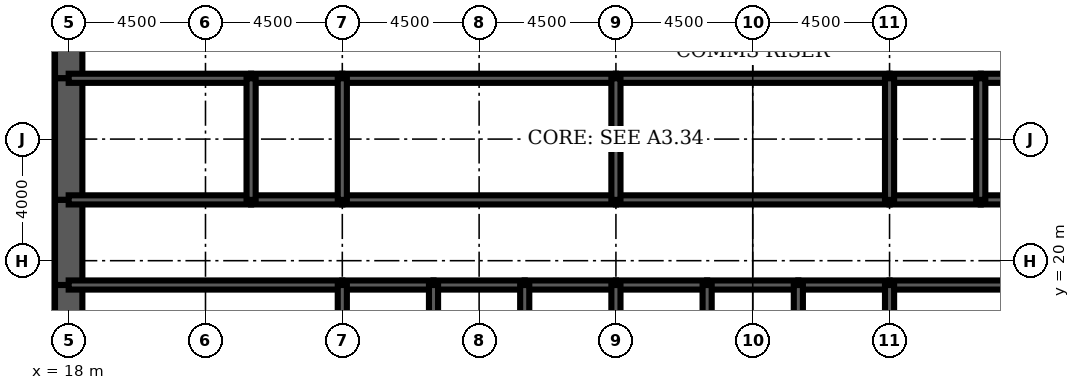
"""IFC4 building model, lengths in metres.
Left out: names, types, materials, properties, quantities, classifications, styles, units other than length and angle.
Written with IfcOpenShell. Run it as: python <this file> out.ifc"""

import sys

from ifc_helpers import new_model, si_unit, direction, frame, frame_2d, origin, place, context, subcontext, project, spatial, rectangle, extrude, element, fill, save


model = new_model("IFC4")
c1 = context("Model", 3, precision=1e-05, world=origin(), true_north=direction((0.0, 1.0)))
c2 = subcontext(c1, "Body", "Model", "MODEL_VIEW")
j1 = project(units=[si_unit("LENGTHUNIT", "METRE"), si_unit("PLANEANGLEUNIT", "RADIAN")], contexts=[c1])
p1 = place(None, origin())
s1 = spatial("IfcSite", under=j1, at=p1, CompositionType="ELEMENT")
p2 = place(p1, origin())
s2 = spatial("IfcBuilding", under=s1, at=p2, CompositionType="ELEMENT")
p3 = place(p2, frame((0.0, 0.0, 146.7)))
s3 = spatial("IfcBuildingStorey", under=s2, at=p3, CompositionType="ELEMENT", Elevation=146.7)
p4 = place(p3, frame((18.0, 28.8, 0.0), z_axis=(0.0, 0.0, 1.0), x_axis=(0.0, -1.0, 0.0)))
e1 = element("IfcWall", 1, at=p4, inside=s3, PredefinedType="SHEAR", context=c2, shape_type="SweptSolid", body=[
    extrude(rectangle(XDim=2.8, YDim=0.9, at=frame_2d((1.4, 0.0))), origin(), (0.0, 0.0, 1.0), 4.2),
])
p5 = place(p4, frame((0.4, 0.0, 0.0)))
e2 = element("IfcOpeningElement", 2, at=p5, cuts=e1, PredefinedType="OPENING", context=c2, shape_type="SweptSolid", body=[
    extrude(rectangle(XDim=1.8, YDim=2.1, at=frame_2d((0.9, 1.05))), frame((0.0, 0.46, 0.0), z_axis=(0.0, -1.0, 0.0), x_axis=(1.0, 0.0, 0.0)), (0.0, 0.0, 1.0), 0.92),
])
p6 = place(p3, frame((18.0, 26.0, 0.0), z_axis=(0.0, 0.0, 1.0), x_axis=(0.0, -1.0, 0.0)))
e3 = element("IfcWall", 3, at=p6, inside=s3, PredefinedType="SHEAR", context=c2, shape_type="SweptSolid", body=[
    extrude(rectangle(XDim=4.0, YDim=0.9, at=frame_2d((2.0, 0.0))), origin(), (0.0, 0.0, 1.0), 4.2),
])
p7 = place(p3, frame((18.0, 22.0, 0.0), z_axis=(0.0, 0.0, 1.0), x_axis=(0.0, -1.0, 0.0)))
e4 = element("IfcWall", 4, at=p7, inside=s3, PredefinedType="SHEAR", context=c2, shape_type="SweptSolid", body=[
    extrude(rectangle(XDim=2.8, YDim=0.9, at=frame_2d((1.4, 0.0))), origin(), (0.0, 0.0, 1.0), 4.2),
])
p8 = place(p7, frame((0.6, 0.0, 0.0)))
e5 = element("IfcOpeningElement", 5, at=p8, cuts=e4, PredefinedType="OPENING", context=c2, shape_type="SweptSolid", body=[
    extrude(rectangle(XDim=1.8, YDim=2.1, at=frame_2d((0.9, 1.05))), frame((0.0, 0.46, 0.0), z_axis=(0.0, -1.0, 0.0), x_axis=(1.0, 0.0, 0.0)), (0.0, 0.0, 1.0), 0.92),
])
p9 = place(p3, frame((18.0, 19.2, 0.0), z_axis=(0.0, 0.0, 1.0), x_axis=(0.0, -1.0, 0.0)))
e6 = element("IfcWall", 6, at=p9, inside=s3, PredefinedType="SHEAR", context=c2, shape_type="SweptSolid", body=[
    extrude(rectangle(XDim=3.2, YDim=0.9, at=frame_2d((1.6, 0.0))), origin(), (0.0, 0.0, 1.0), 4.2),
])
p10 = place(p3, frame((18.0, 19.2, 0.0), z_axis=(0.0, 0.0, 1.0), x_axis=(1.0, 0.0, 0.0)))
e7 = element("IfcWall", 7, at=p10, inside=s3, PredefinedType="SOLIDWALL", context=c2, shape_type="SweptSolid", body=[
    extrude(rectangle(XDim=9.0, YDim=0.3, at=frame_2d((4.5, 0.0))), origin(), (0.0, 0.0, 1.0), 4.2),
])
p11 = place(p10, frame((0.65, 0.0, 0.0)))
e8 = element("IfcOpeningElement", 8, at=p11, cuts=e7, PredefinedType="OPENING", context=c2, shape_type="SweptSolid", body=[
    extrude(rectangle(XDim=1.0, YDim=2.1, at=frame_2d((0.5, 1.05))), frame((0.0, 0.16, 0.0), z_axis=(0.0, -1.0, 0.0), x_axis=(1.0, 0.0, 0.0)), (0.0, 0.0, 1.0), 0.32),
])
p12 = place(p3, frame((27.0, 19.2, 0.0), z_axis=(0.0, 0.0, 1.0), x_axis=(1.0, 0.0, 0.0)))
e9 = element("IfcWall", 9, at=p12, inside=s3, PredefinedType="SOLIDWALL", context=c2, shape_type="SweptSolid", body=[
    extrude(rectangle(XDim=3.0, YDim=0.3, at=frame_2d((1.5, 0.0))), origin(), (0.0, 0.0, 1.0), 4.2),
])
p13 = place(p12, frame((0.95, 0.0, 0.0)))
e10 = element("IfcOpeningElement", 10, at=p13, cuts=e9, PredefinedType="OPENING", context=c2, shape_type="SweptSolid", body=[
    extrude(rectangle(XDim=1.1, YDim=2.2, at=frame_2d((0.55, 1.1))), frame((0.0, 0.16, 0.0), z_axis=(0.0, -1.0, 0.0), x_axis=(1.0, 0.0, 0.0)), (0.0, 0.0, 1.0), 0.32),
])
p14 = place(p3, frame((30.0, 19.2, 0.0), z_axis=(0.0, 0.0, 1.0), x_axis=(1.0, 0.0, 0.0)))
e11 = element("IfcWall", 11, at=p14, inside=s3, PredefinedType="SOLIDWALL", context=c2, shape_type="SweptSolid", body=[
    extrude(rectangle(XDim=3.0, YDim=0.3, at=frame_2d((1.5, 0.0))), origin(), (0.0, 0.0, 1.0), 4.2),
])
p15 = place(p14, frame((0.95, 0.0, 0.0)))
e12 = element("IfcOpeningElement", 12, at=p15, cuts=e11, PredefinedType="OPENING", context=c2, shape_type="SweptSolid", body=[
    extrude(rectangle(XDim=1.1, YDim=2.2, at=frame_2d((0.55, 1.1))), frame((0.0, 0.16, 0.0), z_axis=(0.0, -1.0, 0.0), x_axis=(1.0, 0.0, 0.0)), (0.0, 0.0, 1.0), 0.32),
])
p16 = place(p3, frame((33.0, 19.2, 0.0), z_axis=(0.0, 0.0, 1.0), x_axis=(1.0, 0.0, 0.0)))
e13 = element("IfcWall", 13, at=p16, inside=s3, PredefinedType="SOLIDWALL", context=c2, shape_type="SweptSolid", body=[
    extrude(rectangle(XDim=3.0, YDim=0.3, at=frame_2d((1.5, 0.0))), origin(), (0.0, 0.0, 1.0), 4.2),
])
p17 = place(p16, frame((0.95, 0.0, 0.0)))
e14 = element("IfcOpeningElement", 14, at=p17, cuts=e13, PredefinedType="OPENING", context=c2, shape_type="SweptSolid", body=[
    extrude(rectangle(XDim=1.1, YDim=2.2, at=frame_2d((0.55, 1.1))), frame((0.0, 0.16, 0.0), z_axis=(0.0, -1.0, 0.0), x_axis=(1.0, 0.0, 0.0)), (0.0, 0.0, 1.0), 0.32),
])
p18 = place(p3, frame((36.0, 19.2, 0.0), z_axis=(0.0, 0.0, 1.0), x_axis=(1.0, 0.0, 0.0)))
e15 = element("IfcWall", 15, at=p18, inside=s3, PredefinedType="SOLIDWALL", context=c2, shape_type="SweptSolid", body=[
    extrude(rectangle(XDim=3.0, YDim=0.3, at=frame_2d((1.5, 0.0))), origin(), (0.0, 0.0, 1.0), 4.2),
])
p19 = place(p18, frame((0.95, 0.0, 0.0)))
e16 = element("IfcOpeningElement", 16, at=p19, cuts=e15, PredefinedType="OPENING", context=c2, shape_type="SweptSolid", body=[
    extrude(rectangle(XDim=1.1, YDim=2.2, at=frame_2d((0.55, 1.1))), frame((0.0, 0.16, 0.0), z_axis=(0.0, -1.0, 0.0), x_axis=(1.0, 0.0, 0.0)), (0.0, 0.0, 1.0), 0.32),
])
p20 = place(p3, frame((39.0, 19.2, 0.0), z_axis=(0.0, 0.0, 1.0), x_axis=(1.0, 0.0, 0.0)))
e17 = element("IfcWall", 17, at=p20, inside=s3, PredefinedType="SOLIDWALL", context=c2, shape_type="SweptSolid", body=[
    extrude(rectangle(XDim=3.0, YDim=0.3, at=frame_2d((1.5, 0.0))), origin(), (0.0, 0.0, 1.0), 4.2),
])
p21 = place(p20, frame((1.0, 0.0, 0.0)))
e18 = element("IfcOpeningElement", 18, at=p21, cuts=e17, PredefinedType="OPENING", context=c2, shape_type="SweptSolid", body=[
    extrude(rectangle(XDim=1.0, YDim=2.1, at=frame_2d((0.5, 1.05))), frame((0.0, 0.16, 0.0), z_axis=(0.0, -1.0, 0.0), x_axis=(1.0, 0.0, 0.0)), (0.0, 0.0, 1.0), 0.32),
])
p22 = place(p3, frame((42.0, 19.2, 0.0), z_axis=(0.0, 0.0, 1.0), x_axis=(1.0, 0.0, 0.0)))
e19 = element("IfcWall", 19, at=p22, inside=s3, PredefinedType="SOLIDWALL", context=c2, shape_type="SweptSolid", body=[
    extrude(rectangle(XDim=3.0, YDim=0.3, at=frame_2d((1.5, 0.0))), origin(), (0.0, 0.0, 1.0), 4.2),
])
p23 = place(p3, frame((45.0, 19.2, 0.0), z_axis=(0.0, 0.0, 1.0), x_axis=(1.0, 0.0, 0.0)))
e20 = element("IfcWall", 20, at=p23, inside=s3, PredefinedType="SOLIDWALL", context=c2, shape_type="SweptSolid", body=[
    extrude(rectangle(XDim=9.0, YDim=0.3, at=frame_2d((4.5, 0.0))), origin(), (0.0, 0.0, 1.0), 4.2),
])
p24 = place(p23, frame((7.35, 0.0, 0.0)))
e21 = element("IfcOpeningElement", 21, at=p24, cuts=e20, PredefinedType="OPENING", context=c2, shape_type="SweptSolid", body=[
    extrude(rectangle(XDim=1.0, YDim=2.1, at=frame_2d((0.5, 1.05))), frame((0.0, 0.16, 0.0), z_axis=(0.0, -1.0, 0.0), x_axis=(1.0, 0.0, 0.0)), (0.0, 0.0, 1.0), 0.32),
])
p25 = place(p3, frame((18.0, 22.0, 0.0), z_axis=(0.0, 0.0, 1.0), x_axis=(1.0, 0.0, 0.0)))
e22 = element("IfcWall", 22, at=p25, inside=s3, PredefinedType="SOLIDWALL", context=c2, shape_type="SweptSolid", body=[
    extrude(rectangle(XDim=6.0, YDim=0.3, at=frame_2d((3.0, 0.0))), origin(), (0.0, 0.0, 1.0), 4.2),
])
p26 = place(p25, frame((4.4, 0.0, 0.0)))
e23 = element("IfcOpeningElement", 23, at=p26, cuts=e22, PredefinedType="OPENING", context=c2, shape_type="SweptSolid", body=[
    extrude(rectangle(XDim=1.0, YDim=2.1, at=frame_2d((0.5, 1.05))), frame((0.0, 0.16, 0.0), z_axis=(0.0, -1.0, 0.0), x_axis=(1.0, 0.0, 0.0)), (0.0, 0.0, 1.0), 0.32),
])
p27 = place(p25, frame((0.7, 0.0, 0.0)))
e24 = element("IfcOpeningElement", 24, at=p27, cuts=e22, PredefinedType="OPENING", context=c2, shape_type="SweptSolid", body=[
    extrude(rectangle(XDim=1.0, YDim=2.1, at=frame_2d((0.5, 1.05))), frame((0.0, 0.16, 0.0), z_axis=(0.0, -1.0, 0.0), x_axis=(1.0, 0.0, 0.0)), (0.0, 0.0, 1.0), 0.32),
])
p28 = place(p3, frame((24.0, 22.0, 0.0), z_axis=(0.0, 0.0, 1.0), x_axis=(1.0, 0.0, 0.0)))
e25 = element("IfcWall", 25, at=p28, inside=s3, PredefinedType="SOLIDWALL", context=c2, shape_type="SweptSolid", body=[
    extrude(rectangle(XDim=3.0, YDim=0.3, at=frame_2d((1.5, 0.0))), origin(), (0.0, 0.0, 1.0), 4.2),
])
p29 = place(p28, frame((1.0, 0.0, 0.0)))
e26 = element("IfcOpeningElement", 26, at=p29, cuts=e25, PredefinedType="OPENING", context=c2, shape_type="SweptSolid", body=[
    extrude(rectangle(XDim=1.0, YDim=2.1, at=frame_2d((0.5, 1.05))), frame((0.0, 0.16, 0.0), z_axis=(0.0, -1.0, 0.0), x_axis=(1.0, 0.0, 0.0)), (0.0, 0.0, 1.0), 0.32),
])
p30 = place(p3, frame((27.0, 22.0, 0.0), z_axis=(0.0, 0.0, 1.0), x_axis=(1.0, 0.0, 0.0)))
e27 = element("IfcWall", 27, at=p30, inside=s3, PredefinedType="SOLIDWALL", context=c2, shape_type="SweptSolid", body=[
    extrude(rectangle(XDim=9.0, YDim=0.3, at=frame_2d((4.5, 0.0))), origin(), (0.0, 0.0, 1.0), 4.2),
])
p31 = place(p30, frame((4.0, 0.0, 0.0)))
e28 = element("IfcOpeningElement", 28, at=p31, cuts=e27, PredefinedType="OPENING", context=c2, shape_type="SweptSolid", body=[
    extrude(rectangle(XDim=1.0, YDim=2.1, at=frame_2d((0.5, 1.05))), frame((0.0, 0.16, 0.0), z_axis=(0.0, -1.0, 0.0), x_axis=(1.0, 0.0, 0.0)), (0.0, 0.0, 1.0), 0.32),
])
p32 = place(p3, frame((36.0, 22.0, 0.0), z_axis=(0.0, 0.0, 1.0), x_axis=(1.0, 0.0, 0.0)))
e29 = element("IfcWall", 29, at=p32, inside=s3, PredefinedType="SOLIDWALL", context=c2, shape_type="SweptSolid", body=[
    extrude(rectangle(XDim=9.0, YDim=0.3, at=frame_2d((4.5, 0.0))), origin(), (0.0, 0.0, 1.0), 4.2),
])
p33 = place(p32, frame((4.0, 0.0, 0.0)))
e30 = element("IfcOpeningElement", 30, at=p33, cuts=e29, PredefinedType="OPENING", context=c2, shape_type="SweptSolid", body=[
    extrude(rectangle(XDim=1.0, YDim=2.1, at=frame_2d((0.5, 1.05))), frame((0.0, 0.16, 0.0), z_axis=(0.0, -1.0, 0.0), x_axis=(1.0, 0.0, 0.0)), (0.0, 0.0, 1.0), 0.32),
])
p34 = place(p3, frame((45.0, 22.0, 0.0), z_axis=(0.0, 0.0, 1.0), x_axis=(1.0, 0.0, 0.0)))
e31 = element("IfcWall", 31, at=p34, inside=s3, PredefinedType="SOLIDWALL", context=c2, shape_type="SweptSolid", body=[
    extrude(rectangle(XDim=3.0, YDim=0.3, at=frame_2d((1.5, 0.0))), origin(), (0.0, 0.0, 1.0), 4.2),
])
p35 = place(p34, frame((1.0, 0.0, 0.0)))
e32 = element("IfcOpeningElement", 32, at=p35, cuts=e31, PredefinedType="OPENING", context=c2, shape_type="SweptSolid", body=[
    extrude(rectangle(XDim=1.0, YDim=2.1, at=frame_2d((0.5, 1.05))), frame((0.0, 0.16, 0.0), z_axis=(0.0, -1.0, 0.0), x_axis=(1.0, 0.0, 0.0)), (0.0, 0.0, 1.0), 0.32),
])
p36 = place(p3, frame((48.0, 22.0, 0.0), z_axis=(0.0, 0.0, 1.0), x_axis=(1.0, 0.0, 0.0)))
e33 = element("IfcWall", 33, at=p36, inside=s3, PredefinedType="SOLIDWALL", context=c2, shape_type="SweptSolid", body=[
    extrude(rectangle(XDim=6.0, YDim=0.3, at=frame_2d((3.0, 0.0))), origin(), (0.0, 0.0, 1.0), 4.2),
])
p37 = place(p36, frame((2.0, 0.0, 0.0)))
e34 = element("IfcOpeningElement", 34, at=p37, cuts=e33, PredefinedType="OPENING", context=c2, shape_type="SweptSolid", body=[
    extrude(rectangle(XDim=1.0, YDim=2.1, at=frame_2d((0.5, 1.05))), frame((0.0, 0.16, 0.0), z_axis=(0.0, -1.0, 0.0), x_axis=(1.0, 0.0, 0.0)), (0.0, 0.0, 1.0), 0.32),
])
p38 = place(p3, frame((18.0, 26.0, 0.0), z_axis=(0.0, 0.0, 1.0), x_axis=(1.0, 0.0, 0.0)))
e35 = element("IfcWall", 35, at=p38, inside=s3, PredefinedType="SOLIDWALL", context=c2, shape_type="SweptSolid", body=[
    extrude(rectangle(XDim=6.0, YDim=0.3, at=frame_2d((3.0, 0.0))), origin(), (0.0, 0.0, 1.0), 4.2),
])
p39 = place(p3, frame((24.0, 26.0, 0.0), z_axis=(0.0, 0.0, 1.0), x_axis=(1.0, 0.0, 0.0)))
e36 = element("IfcWall", 36, at=p39, inside=s3, PredefinedType="SOLIDWALL", context=c2, shape_type="SweptSolid", body=[
    extrude(rectangle(XDim=3.0, YDim=0.3, at=frame_2d((1.5, 0.0))), origin(), (0.0, 0.0, 1.0), 4.2),
])
for number, where, z_axis, x_axis in (
    (37, (27.0, 26.0, 0.0), (0.0, 0.0, 1.0), (1.0, 0.0, 0.0)),
    (38, (36.0, 26.0, 0.0), (0.0, 0.0, 1.0), (1.0, 0.0, 0.0)),
):
    element("IfcWall", number, at=place(p3, frame(where, z_axis=z_axis, x_axis=x_axis)), inside=s3, PredefinedType="SOLIDWALL", context=c2, shape_type="SweptSolid", body=[
        extrude(rectangle(XDim=9.0, YDim=0.3, at=frame_2d((4.5, 0.0))), origin(), (0.0, 0.0, 1.0), 4.2),
    ])
p40 = place(p3, frame((45.0, 26.0, 0.0), z_axis=(0.0, 0.0, 1.0), x_axis=(1.0, 0.0, 0.0)))
e39 = element("IfcWall", 39, at=p40, inside=s3, PredefinedType="SOLIDWALL", context=c2, shape_type="SweptSolid", body=[
    extrude(rectangle(XDim=3.0, YDim=0.3, at=frame_2d((1.5, 0.0))), origin(), (0.0, 0.0, 1.0), 4.2),
])
p41 = place(p3, frame((48.0, 26.0, 0.0), z_axis=(0.0, 0.0, 1.0), x_axis=(1.0, 0.0, 0.0)))
e40 = element("IfcWall", 40, at=p41, inside=s3, PredefinedType="SOLIDWALL", context=c2, shape_type="SweptSolid", body=[
    extrude(rectangle(XDim=6.0, YDim=0.3, at=frame_2d((3.0, 0.0))), origin(), (0.0, 0.0, 1.0), 4.2),
])
for number, where, z_axis, x_axis in (
    (41, (27.0, 16.0, 0.0), (0.0, 0.0, 1.0), (0.0, 1.0, 0.0)),
    (42, (30.0, 16.0, 0.0), (0.0, 0.0, 1.0), (0.0, 1.0, 0.0)),
    (43, (33.0, 16.0, 0.0), (0.0, 0.0, 1.0), (0.0, 1.0, 0.0)),
    (44, (36.0, 16.0, 0.0), (0.0, 0.0, 1.0), (0.0, 1.0, 0.0)),
    (45, (39.0, 16.0, 0.0), (0.0, 0.0, 1.0), (0.0, 1.0, 0.0)),
    (46, (42.0, 16.0, 0.0), (0.0, 0.0, 1.0), (0.0, 1.0, 0.0)),
    (47, (45.0, 16.0, 0.0), (0.0, 0.0, 1.0), (0.0, 1.0, 0.0)),
):
    element("IfcWall", number, at=place(p3, frame(where, z_axis=z_axis, x_axis=x_axis)), inside=s3, PredefinedType="SOLIDWALL", context=c2, shape_type="SweptSolid", body=[
        extrude(rectangle(XDim=3.2, YDim=0.3, at=frame_2d((1.6, 0.0))), origin(), (0.0, 0.0, 1.0), 4.2),
    ])
for number, where, z_axis, x_axis in (
    (48, (24.0, 22.0, 0.0), (0.0, 0.0, 1.0), (0.0, 1.0, 0.0)),
    (49, (27.0, 22.0, 0.0), (0.0, 0.0, 1.0), (0.0, 1.0, 0.0)),
    (50, (36.0, 22.0, 0.0), (0.0, 0.0, 1.0), (0.0, 1.0, 0.0)),
    (51, (45.0, 22.0, 0.0), (0.0, 0.0, 1.0), (0.0, 1.0, 0.0)),
    (52, (48.0, 22.0, 0.0), (0.0, 0.0, 1.0), (0.0, 1.0, 0.0)),
):
    element("IfcWall", number, at=place(p3, frame(where, z_axis=z_axis, x_axis=x_axis)), inside=s3, PredefinedType="SOLIDWALL", context=c2, shape_type="SweptSolid", body=[
        extrude(rectangle(XDim=4.0, YDim=0.3, at=frame_2d((2.0, 0.0))), origin(), (0.0, 0.0, 1.0), 4.2),
    ])
p42 = place(p3, frame((42.0, 22.15, 0.0), z_axis=(0.0, 0.0, 1.0), x_axis=(0.0, 1.0, 0.0)))
e53 = element("IfcWall", 53, at=p42, inside=s3, PredefinedType="PARTITIONING", context=c2, shape_type="SweptSolid", body=[
    extrude(rectangle(XDim=3.7, YDim=0.15, at=frame_2d((1.85, 0.0))), origin(), (0.0, 0.0, 1.0), 3.0),
])
p43 = place(p42, frame((2.2, 0.0, 0.0)))
e54 = element("IfcOpeningElement", 54, at=p43, cuts=e53, PredefinedType="OPENING", context=c2, shape_type="SweptSolid", body=[
    extrude(rectangle(XDim=1.0, YDim=2.1, at=frame_2d((0.5, 1.05))), frame((0.0, 0.085, 0.0), z_axis=(0.0, -1.0, 0.0), x_axis=(1.0, 0.0, 0.0)), (0.0, 0.0, 1.0), 0.17),
])
p44 = place(p3, frame((20.025, 22.15, 0.0), z_axis=(0.0, 0.0, 1.0), x_axis=(0.0, 1.0, 0.0)))
e55 = element("IfcWall", 55, at=p44, inside=s3, PredefinedType="PARTITIONING", context=c2, shape_type="SweptSolid", body=[
    extrude(rectangle(XDim=3.7, YDim=0.15, at=frame_2d((1.85, 0.0))), origin(), (0.0, 0.0, 1.0), 3.0),
])
p45 = place(p3, frame((47.7, 19.35, 0.0), z_axis=(0.0, 0.0, 1.0), x_axis=(0.0, 1.0, 0.0)))
e56 = element("IfcWall", 56, at=p45, inside=s3, PredefinedType="PARTITIONING", context=c2, shape_type="SweptSolid", body=[
    extrude(rectangle(XDim=2.5, YDim=0.15, at=frame_2d((1.25, 0.0))), origin(), (0.0, 0.0, 1.0), 3.0),
])
p46 = place(p45, frame((1.15, 0.0, 0.0)))
e57 = element("IfcOpeningElement", 57, at=p46, cuts=e56, PredefinedType="OPENING", context=c2, shape_type="SweptSolid", body=[
    extrude(rectangle(XDim=1.0, YDim=2.1, at=frame_2d((0.5, 1.05))), frame((0.0, 0.085, 0.0), z_axis=(0.0, -1.0, 0.0), x_axis=(1.0, 0.0, 0.0)), (0.0, 0.0, 1.0), 0.17),
])
p47 = place(p43, origin())
e58 = element("IfcDoor", 58, at=p47, inside=s3, OperationType="SINGLE_SWING_RIGHT", PredefinedType="DOOR", context=c2, shape_type="SweptSolid", body=[
    extrude(rectangle(XDim=1.0, YDim=2.1, at=frame_2d((0.5, 1.05))), frame((0.0, 0.025, 0.0), z_axis=(0.0, -1.0, 0.0), x_axis=(1.0, 0.0, 0.0)), (0.0, 0.0, 1.0), 0.05),
])
fill(e54, e58)
p48 = place(p46, origin())
e59 = element("IfcDoor", 59, at=p48, inside=s3, OperationType="SINGLE_SWING_RIGHT", PredefinedType="DOOR", context=c2, shape_type="SweptSolid", body=[
    extrude(rectangle(XDim=1.0, YDim=2.1, at=frame_2d((0.5, 1.05))), frame((0.0, 0.025, 0.0), z_axis=(0.0, -1.0, 0.0), x_axis=(1.0, 0.0, 0.0)), (0.0, 0.0, 1.0), 0.05),
])
fill(e57, e59)
p49 = place(p13, origin())
e60 = element("IfcDoor", 60, at=p49, inside=s3, OperationType="DOUBLE_DOOR_SLIDING", PredefinedType="USERDEFINED", context=c2, shape_type="SweptSolid", body=[
    extrude(rectangle(XDim=1.1, YDim=2.2, at=frame_2d((0.55, 1.1))), frame((0.0, 0.025, 0.0), z_axis=(0.0, -1.0, 0.0), x_axis=(1.0, 0.0, 0.0)), (0.0, 0.0, 1.0), 0.05),
])
fill(e10, e60)
p50 = place(p15, origin())
e61 = element("IfcDoor", 61, at=p50, inside=s3, OperationType="DOUBLE_DOOR_SLIDING", PredefinedType="USERDEFINED", context=c2, shape_type="SweptSolid", body=[
    extrude(rectangle(XDim=1.1, YDim=2.2, at=frame_2d((0.55, 1.1))), frame((0.0, 0.025, 0.0), z_axis=(0.0, -1.0, 0.0), x_axis=(1.0, 0.0, 0.0)), (0.0, 0.0, 1.0), 0.05),
])
fill(e12, e61)
p51 = place(p17, origin())
e62 = element("IfcDoor", 62, at=p51, inside=s3, OperationType="DOUBLE_DOOR_SLIDING", PredefinedType="USERDEFINED", context=c2, shape_type="SweptSolid", body=[
    extrude(rectangle(XDim=1.1, YDim=2.2, at=frame_2d((0.55, 1.1))), frame((0.0, 0.025, 0.0), z_axis=(0.0, -1.0, 0.0), x_axis=(1.0, 0.0, 0.0)), (0.0, 0.0, 1.0), 0.05),
])
fill(e14, e62)
p52 = place(p19, origin())
e63 = element("IfcDoor", 63, at=p52, inside=s3, OperationType="DOUBLE_DOOR_SLIDING", PredefinedType="USERDEFINED", context=c2, shape_type="SweptSolid", body=[
    extrude(rectangle(XDim=1.1, YDim=2.2, at=frame_2d((0.55, 1.1))), frame((0.0, 0.025, 0.0), z_axis=(0.0, -1.0, 0.0), x_axis=(1.0, 0.0, 0.0)), (0.0, 0.0, 1.0), 0.05),
])
fill(e16, e63)
p53 = place(p11, origin())
e64 = element("IfcDoor", 64, at=p53, inside=s3, OperationType="SINGLE_SWING_LEFT", PredefinedType="DOOR", context=c2, shape_type="SweptSolid", body=[
    extrude(rectangle(XDim=1.0, YDim=2.1, at=frame_2d((0.5, 1.05))), frame((0.0, 0.025, 0.0), z_axis=(0.0, -1.0, 0.0), x_axis=(1.0, 0.0, 0.0)), (0.0, 0.0, 1.0), 0.05),
])
fill(e8, e64)
p54 = place(p8, origin())
e65 = element("IfcDoor", 65, at=p54, inside=s3, OperationType="SINGLE_SWING_LEFT", PredefinedType="DOOR", context=c2, shape_type="SweptSolid", body=[
    extrude(rectangle(XDim=1.8, YDim=2.1, at=frame_2d((0.9, 1.05))), frame((0.0, 0.45, 0.0), z_axis=(0.0, -1.0, 0.0), x_axis=(1.0, 0.0, 0.0)), (0.0, 0.0, 1.0), 0.899),
])
fill(e5, e65)
p55 = place(p5, origin())
e66 = element("IfcDoor", 66, at=p55, inside=s3, OperationType="SINGLE_SWING_LEFT", PredefinedType="DOOR", context=c2, shape_type="SweptSolid", body=[
    extrude(rectangle(XDim=1.8, YDim=2.1, at=frame_2d((0.9, 1.05))), frame((0.0, 0.45, 0.0), z_axis=(0.0, -1.0, 0.0), x_axis=(1.0, 0.0, 0.0)), (0.0, 0.0, 1.0), 0.899),
])
fill(e2, e66)
p56 = place(p26, origin())
e67 = element("IfcDoor", 67, at=p56, inside=s3, OperationType="SINGLE_SWING_RIGHT", PredefinedType="DOOR", context=c2, shape_type="SweptSolid", body=[
    extrude(rectangle(XDim=1.0, YDim=2.1, at=frame_2d((0.5, 1.05))), frame((0.0, 0.025, 0.0), z_axis=(0.0, -1.0, 0.0), x_axis=(1.0, 0.0, 0.0)), (0.0, 0.0, 1.0), 0.05),
])
fill(e23, e67)
p57 = place(p29, origin())
e68 = element("IfcDoor", 68, at=p57, inside=s3, OperationType="SINGLE_SWING_LEFT", PredefinedType="DOOR", context=c2, shape_type="SweptSolid", body=[
    extrude(rectangle(XDim=1.0, YDim=2.1, at=frame_2d((0.5, 1.05))), frame((0.0, 0.025, 0.0), z_axis=(0.0, -1.0, 0.0), x_axis=(1.0, 0.0, 0.0)), (0.0, 0.0, 1.0), 0.05),
])
fill(e26, e68)
p58 = place(p31, origin())
e69 = element("IfcDoor", 69, at=p58, inside=s3, OperationType="SINGLE_SWING_LEFT", PredefinedType="DOOR", context=c2, shape_type="SweptSolid", body=[
    extrude(rectangle(XDim=1.0, YDim=2.1, at=frame_2d((0.5, 1.05))), frame((0.0, 0.025, 0.0), z_axis=(0.0, -1.0, 0.0), x_axis=(1.0, 0.0, 0.0)), (0.0, 0.0, 1.0), 0.05),
])
fill(e28, e69)
p59 = place(p33, origin())
e70 = element("IfcDoor", 70, at=p59, inside=s3, OperationType="SINGLE_SWING_LEFT", PredefinedType="DOOR", context=c2, shape_type="SweptSolid", body=[
    extrude(rectangle(XDim=1.0, YDim=2.1, at=frame_2d((0.5, 1.05))), frame((0.0, 0.025, 0.0), z_axis=(0.0, -1.0, 0.0), x_axis=(1.0, 0.0, 0.0)), (0.0, 0.0, 1.0), 0.05),
])
fill(e30, e70)
p60 = place(p35, origin())
e71 = element("IfcDoor", 71, at=p60, inside=s3, OperationType="SINGLE_SWING_LEFT", PredefinedType="DOOR", context=c2, shape_type="SweptSolid", body=[
    extrude(rectangle(XDim=1.0, YDim=2.1, at=frame_2d((0.5, 1.05))), frame((0.0, 0.025, 0.0), z_axis=(0.0, -1.0, 0.0), x_axis=(1.0, 0.0, 0.0)), (0.0, 0.0, 1.0), 0.05),
])
fill(e32, e71)
p61 = place(p27, origin())
e72 = element("IfcDoor", 72, at=p61, inside=s3, OperationType="SINGLE_SWING_LEFT", PredefinedType="DOOR", context=c2, shape_type="SweptSolid", body=[
    extrude(rectangle(XDim=1.0, YDim=2.1, at=frame_2d((0.5, 1.05))), frame((0.0, 0.025, 0.0), z_axis=(0.0, -1.0, 0.0), x_axis=(1.0, 0.0, 0.0)), (0.0, 0.0, 1.0), 0.05),
])
fill(e24, e72)
p62 = place(p21, origin())
e73 = element("IfcDoor", 73, at=p62, inside=s3, OperationType="SINGLE_SWING_LEFT", PredefinedType="DOOR", context=c2, shape_type="SweptSolid", body=[
    extrude(rectangle(XDim=1.0, YDim=2.1, at=frame_2d((0.5, 1.05))), frame((0.0, 0.025, 0.0), z_axis=(0.0, -1.0, 0.0), x_axis=(1.0, 0.0, 0.0)), (0.0, 0.0, 1.0), 0.05),
])
fill(e18, e73)
save(model, sys.argv[1])
